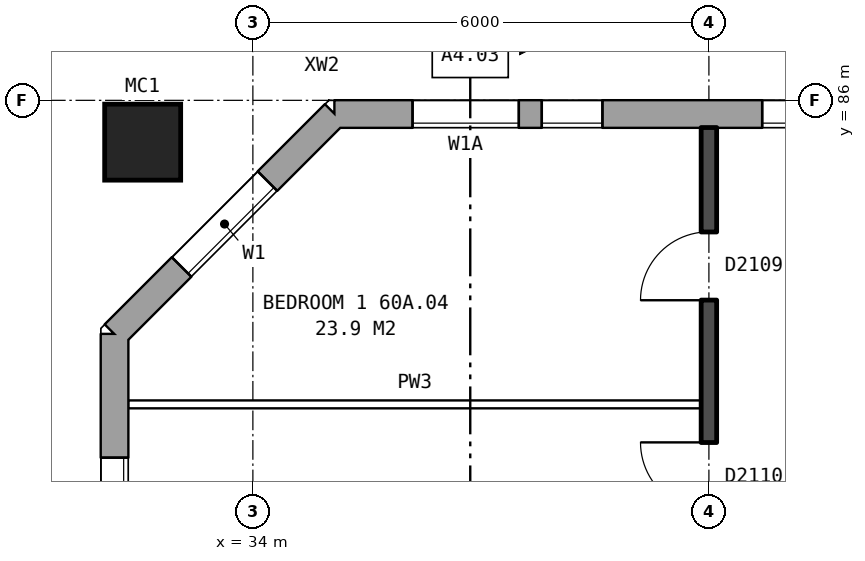
"""IFC4 building model, lengths in metres.
Left out: names, types, materials, properties, quantities, classifications, styles, units other than length and angle.
Written with IfcOpenShell. Run it as: python <this file> out.ifc"""

import sys

from ifc_helpers import new_model, si_unit, direction, frame, frame_2d, origin, origin_2d, place, context, subcontext, project, spatial, rectangle, hollow_rectangle, extrude, element, fill, save


model = new_model("IFC4")
c1 = context("Model", 3, precision=1e-05, world=origin(), true_north=direction((0.0, 1.0)))
c2 = subcontext(c1, "Body", "Model", "MODEL_VIEW")
j1 = project(units=[si_unit("LENGTHUNIT", "METRE"), si_unit("PLANEANGLEUNIT", "RADIAN")], contexts=[c1])
p1 = place(None, origin())
s1 = spatial("IfcSite", under=j1, at=p1, CompositionType="ELEMENT")
p2 = place(p1, origin())
s2 = spatial("IfcBuilding", under=s1, at=p2, CompositionType="ELEMENT")
p3 = place(p2, frame((0.0, 0.0, 212.1)))
s3 = spatial("IfcBuildingStorey", under=s2, at=p3, CompositionType="ELEMENT", Elevation=212.1)
p4 = place(p3, frame((32.55, 85.45, 0.0), z_axis=(0.0, 0.0, 1.0), x_axis=(1.0, 0.0, 0.0)))
e1 = element("IfcColumn", 1, at=p4, inside=s3, PredefinedType="COLUMN", context=c2, shape_type="SweptSolid", body=[
    extrude(hollow_rectangle(XDim=1.0, YDim=1.0, WallThickness=0.055, at=origin_2d()), origin(), (0.0, 0.0, 1.0), 3.1),
])
p5 = place(p3, frame((74.95, 85.82, 0.0), z_axis=(0.0, 0.0, 1.0), x_axis=(-1.0, 0.0, 0.0)))
e2 = element("IfcWall", 2, at=p5, inside=s3, PredefinedType="STANDARD", context=c2, shape_type="SweptSolid", body=[
    extrude(rectangle(XDim=39.875, YDim=0.36, at=frame_2d((19.938, 0.0))), origin(), (0.0, 0.0, 1.0), 2.85),
])
p6 = place(p5, frame((2.65, 0.0, 0.8)))
e3 = element("IfcOpeningElement", 3, at=p6, cuts=e2, PredefinedType="OPENING", context=c2, shape_type="SweptSolid", body=[
    extrude(rectangle(XDim=1.6, YDim=1.8, at=frame_2d((0.8, 0.9))), frame((0.0, 0.19, 0.0), z_axis=(0.0, -1.0, 0.0), x_axis=(1.0, 0.0, 0.0)), (0.0, 0.0, 1.0), 0.38),
])
p7 = place(p5, frame((5.15, 0.0, 1.5)))
e4 = element("IfcOpeningElement", 4, at=p7, cuts=e2, PredefinedType="OPENING", context=c2, shape_type="SweptSolid", body=[
    extrude(rectangle(XDim=0.6, YDim=0.9, at=frame_2d((0.3, 0.45))), frame((0.0, 0.19, 0.0), z_axis=(0.0, -1.0, 0.0), x_axis=(1.0, 0.0, 0.0)), (0.0, 0.0, 1.0), 0.38),
])
p8 = place(p5, frame((8.65, 0.0, 0.8)))
e5 = element("IfcOpeningElement", 5, at=p8, cuts=e2, PredefinedType="OPENING", context=c2, shape_type="SweptSolid", body=[
    extrude(rectangle(XDim=1.6, YDim=1.8, at=frame_2d((0.8, 0.9))), frame((0.0, 0.19, 0.0), z_axis=(0.0, -1.0, 0.0), x_axis=(1.0, 0.0, 0.0)), (0.0, 0.0, 1.0), 0.38),
])
p9 = place(p5, frame((11.65, 0.0, 0.8)))
e6 = element("IfcOpeningElement", 6, at=p9, cuts=e2, PredefinedType="OPENING", context=c2, shape_type="SweptSolid", body=[
    extrude(rectangle(XDim=1.6, YDim=1.8, at=frame_2d((0.8, 0.9))), frame((0.0, 0.19, 0.0), z_axis=(0.0, -1.0, 0.0), x_axis=(1.0, 0.0, 0.0)), (0.0, 0.0, 1.0), 0.38),
])
p10 = place(p5, frame((14.65, 0.0, 0.8)))
e7 = element("IfcOpeningElement", 7, at=p10, cuts=e2, PredefinedType="OPENING", context=c2, shape_type="SweptSolid", body=[
    extrude(rectangle(XDim=1.6, YDim=1.8, at=frame_2d((0.8, 0.9))), frame((0.0, 0.19, 0.0), z_axis=(0.0, -1.0, 0.0), x_axis=(1.0, 0.0, 0.0)), (0.0, 0.0, 1.0), 0.38),
])
p11 = place(p5, frame((17.65, 0.0, 0.8)))
e8 = element("IfcOpeningElement", 8, at=p11, cuts=e2, PredefinedType="OPENING", context=c2, shape_type="SweptSolid", body=[
    extrude(rectangle(XDim=1.6, YDim=1.8, at=frame_2d((0.8, 0.9))), frame((0.0, 0.19, 0.0), z_axis=(0.0, -1.0, 0.0), x_axis=(1.0, 0.0, 0.0)), (0.0, 0.0, 1.0), 0.38),
])
p12 = place(p5, frame((20.65, 0.0, 0.8)))
e9 = element("IfcOpeningElement", 9, at=p12, cuts=e2, PredefinedType="OPENING", context=c2, shape_type="SweptSolid", body=[
    extrude(rectangle(XDim=1.6, YDim=1.8, at=frame_2d((0.8, 0.9))), frame((0.0, 0.19, 0.0), z_axis=(0.0, -1.0, 0.0), x_axis=(1.0, 0.0, 0.0)), (0.0, 0.0, 1.0), 0.38),
])
p13 = place(p5, frame((23.65, 0.0, 0.8)))
e10 = element("IfcOpeningElement", 10, at=p13, cuts=e2, PredefinedType="OPENING", context=c2, shape_type="SweptSolid", body=[
    extrude(rectangle(XDim=1.6, YDim=1.8, at=frame_2d((0.8, 0.9))), frame((0.0, 0.19, 0.0), z_axis=(0.0, -1.0, 0.0), x_axis=(1.0, 0.0, 0.0)), (0.0, 0.0, 1.0), 0.38),
])
p14 = place(p5, frame((26.65, 0.0, 0.8)))
e11 = element("IfcOpeningElement", 11, at=p14, cuts=e2, PredefinedType="OPENING", context=c2, shape_type="SweptSolid", body=[
    extrude(rectangle(XDim=1.6, YDim=1.8, at=frame_2d((0.8, 0.9))), frame((0.0, 0.19, 0.0), z_axis=(0.0, -1.0, 0.0), x_axis=(1.0, 0.0, 0.0)), (0.0, 0.0, 1.0), 0.38),
])
p15 = place(p5, frame((29.65, 0.0, 0.8)))
e12 = element("IfcOpeningElement", 12, at=p15, cuts=e2, PredefinedType="OPENING", context=c2, shape_type="SweptSolid", body=[
    extrude(rectangle(XDim=1.6, YDim=1.8, at=frame_2d((0.8, 0.9))), frame((0.0, 0.19, 0.0), z_axis=(0.0, -1.0, 0.0), x_axis=(1.0, 0.0, 0.0)), (0.0, 0.0, 1.0), 0.38),
])
p16 = place(p5, frame((32.65, 0.0, 0.8)))
e13 = element("IfcOpeningElement", 13, at=p16, cuts=e2, PredefinedType="OPENING", context=c2, shape_type="SweptSolid", body=[
    extrude(rectangle(XDim=1.6, YDim=1.8, at=frame_2d((0.8, 0.9))), frame((0.0, 0.19, 0.0), z_axis=(0.0, -1.0, 0.0), x_axis=(1.0, 0.0, 0.0)), (0.0, 0.0, 1.0), 0.38),
])
p17 = place(p5, frame((36.35, 0.0, 1.1)))
e14 = element("IfcOpeningElement", 14, at=p17, cuts=e2, PredefinedType="OPENING", context=c2, shape_type="SweptSolid", body=[
    extrude(rectangle(XDim=0.8, YDim=1.5, at=frame_2d((0.4, 0.75))), frame((0.0, 0.19, 0.0), z_axis=(0.0, -1.0, 0.0), x_axis=(1.0, 0.0, 0.0)), (0.0, 0.0, 1.0), 0.38),
])
p18 = place(p5, frame((7.45, 0.0, 0.8)))
e15 = element("IfcOpeningElement", 15, at=p18, cuts=e2, PredefinedType="OPENING", context=c2, shape_type="SweptSolid", body=[
    extrude(rectangle(XDim=0.8, YDim=1.5, at=frame_2d((0.4, 0.75))), frame((0.0, 0.19, 0.0), z_axis=(0.0, -1.0, 0.0), x_axis=(1.0, 0.0, 0.0)), (0.0, 0.0, 1.0), 0.38),
])
p19 = place(p5, frame((37.45, 0.0, 0.8)))
e16 = element("IfcOpeningElement", 16, at=p19, cuts=e2, PredefinedType="OPENING", context=c2, shape_type="SweptSolid", body=[
    extrude(rectangle(XDim=1.4, YDim=1.8, at=frame_2d((0.7, 0.9))), frame((0.0, 0.19, 0.0), z_axis=(0.0, -1.0, 0.0), x_axis=(1.0, 0.0, 0.0)), (0.0, 0.0, 1.0), 0.38),
])
p20 = place(p3, frame((35.075, 85.82, 0.0), z_axis=(0.0, 0.0, 1.0), x_axis=(-0.707106781187, -0.707106781187, 0.0)))
e17 = element("IfcWall", 17, at=p20, inside=s3, PredefinedType="STANDARD", context=c2, shape_type="SweptSolid", body=[
    extrude(rectangle(XDim=4.094, YDim=0.36, at=frame_2d((2.047, 0.0))), origin(), (0.0, 0.0, 1.0), 2.85),
])
p21 = place(p20, frame((1.247, 0.0, 0.8)))
e18 = element("IfcOpeningElement", 18, at=p21, cuts=e17, PredefinedType="OPENING", context=c2, shape_type="SweptSolid", body=[
    extrude(rectangle(XDim=1.6, YDim=1.8, at=frame_2d((0.8, 0.9))), frame((0.0, 0.19, 0.0), z_axis=(0.0, -1.0, 0.0), x_axis=(1.0, 0.0, 0.0)), (0.0, 0.0, 1.0), 0.38),
])
p22 = place(p3, frame((32.18, 82.925, 0.0), z_axis=(0.0, 0.0, 1.0), x_axis=(0.0, -1.0, 0.0)))
e19 = element("IfcWall", 19, at=p22, inside=s3, PredefinedType="STANDARD", context=c2, shape_type="SweptSolid", body=[
    extrude(rectangle(XDim=25.851, YDim=0.36, at=frame_2d((12.925, 0.0))), origin(), (0.0, 0.0, 1.0), 2.85),
])
p23 = place(p22, frame((1.625, 0.0, 0.8)))
e20 = element("IfcOpeningElement", 20, at=p23, cuts=e19, PredefinedType="OPENING", context=c2, shape_type="SweptSolid", body=[
    extrude(rectangle(XDim=1.6, YDim=1.8, at=frame_2d((0.8, 0.9))), frame((0.0, 0.19, 0.0), z_axis=(0.0, -1.0, 0.0), x_axis=(1.0, 0.0, 0.0)), (0.0, 0.0, 1.0), 0.38),
])
p24 = place(p22, frame((4.625, 0.0, 0.8)))
e21 = element("IfcOpeningElement", 21, at=p24, cuts=e19, PredefinedType="OPENING", context=c2, shape_type="SweptSolid", body=[
    extrude(rectangle(XDim=1.6, YDim=1.8, at=frame_2d((0.8, 0.9))), frame((0.0, 0.19, 0.0), z_axis=(0.0, -1.0, 0.0), x_axis=(1.0, 0.0, 0.0)), (0.0, 0.0, 1.0), 0.38),
])
p25 = place(p22, frame((19.625, 0.0, 0.8)))
e22 = element("IfcOpeningElement", 22, at=p25, cuts=e19, PredefinedType="OPENING", context=c2, shape_type="SweptSolid", body=[
    extrude(rectangle(XDim=1.6, YDim=1.8, at=frame_2d((0.8, 0.9))), frame((0.0, 0.19, 0.0), z_axis=(0.0, -1.0, 0.0), x_axis=(1.0, 0.0, 0.0)), (0.0, 0.0, 1.0), 0.38),
])
p26 = place(p22, frame((22.625, 0.0, 0.8)))
e23 = element("IfcOpeningElement", 23, at=p26, cuts=e19, PredefinedType="OPENING", context=c2, shape_type="SweptSolid", body=[
    extrude(rectangle(XDim=1.6, YDim=1.8, at=frame_2d((0.8, 0.9))), frame((0.0, 0.19, 0.0), z_axis=(0.0, -1.0, 0.0), x_axis=(1.0, 0.0, 0.0)), (0.0, 0.0, 1.0), 0.38),
])
p27 = place(p3, frame((32.36, 82.0, 0.0), z_axis=(0.0, 0.0, 1.0), x_axis=(1.0, 0.0, 0.0)))
e24 = element("IfcWall", 24, at=p27, inside=s3, PredefinedType="PARTITIONING", context=c2, shape_type="SweptSolid", body=[
    extrude(rectangle(XDim=7.54, YDim=0.1, at=frame_2d((3.77, 0.0))), origin(), (0.0, 0.0, 1.0), 2.85),
])
p28 = place(p3, frame((40.0, 76.2, 0.0), z_axis=(0.0, 0.0, 1.0), x_axis=(0.0, 1.0, 0.0)))
e25 = element("IfcWall", 25, at=p28, inside=s3, PredefinedType="SOLIDWALL", context=c2, shape_type="SweptSolid", body=[
    extrude(rectangle(XDim=9.44, YDim=0.2, at=frame_2d((4.72, 0.0))), origin(), (0.0, 0.0, 1.0), 2.85),
])
p29 = place(p28, frame((7.17, 0.0, 0.0)))
e26 = element("IfcOpeningElement", 26, at=p29, cuts=e25, PredefinedType="OPENING", context=c2, shape_type="SweptSolid", body=[
    extrude(rectangle(XDim=0.9, YDim=2.1, at=frame_2d((0.45, 1.05))), frame((0.0, 0.11, 0.0), z_axis=(0.0, -1.0, 0.0), x_axis=(1.0, 0.0, 0.0)), (0.0, 0.0, 1.0), 0.22),
])
p30 = place(p28, frame((4.4, 0.0, 0.0)))
e27 = element("IfcOpeningElement", 27, at=p30, cuts=e25, PredefinedType="OPENING", context=c2, shape_type="SweptSolid", body=[
    extrude(rectangle(XDim=0.9, YDim=2.1, at=frame_2d((0.45, 1.05))), frame((0.0, 0.11, 0.0), z_axis=(0.0, -1.0, 0.0), x_axis=(1.0, 0.0, 0.0)), (0.0, 0.0, 1.0), 0.22),
])
p31 = place(p28, frame((0.95, 0.0, 0.0)))
e28 = element("IfcOpeningElement", 28, at=p31, cuts=e25, PredefinedType="OPENING", context=c2, shape_type="SweptSolid", body=[
    extrude(rectangle(XDim=0.9, YDim=2.1, at=frame_2d((0.45, 1.05))), frame((0.0, 0.11, 0.0), z_axis=(0.0, -1.0, 0.0), x_axis=(1.0, 0.0, 0.0)), (0.0, 0.0, 1.0), 0.22),
])
p32 = place(p16, origin())
e29 = element("IfcWindow", 29, at=p32, inside=s3, PartitioningType="SINGLE_PANEL", PredefinedType="WINDOW", context=c2, shape_type="SweptSolid", body=[
    extrude(rectangle(XDim=1.6, YDim=1.8, at=frame_2d((0.8, 0.9))), frame((0.0, 0.15, 0.0), z_axis=(0.0, -1.0, 0.0), x_axis=(1.0, 0.0, 0.0)), (0.0, 0.0, 1.0), 0.06),
])
fill(e13, e29)
p33 = place(p17, origin())
e30 = element("IfcWindow", 30, at=p33, inside=s3, PartitioningType="SINGLE_PANEL", PredefinedType="WINDOW", context=c2, shape_type="SweptSolid", body=[
    extrude(rectangle(XDim=0.8, YDim=1.5, at=frame_2d((0.4, 0.75))), frame((0.0, 0.15, 0.0), z_axis=(0.0, -1.0, 0.0), x_axis=(1.0, 0.0, 0.0)), (0.0, 0.0, 1.0), 0.06),
])
fill(e14, e30)
p34 = place(p21, origin())
e31 = element("IfcWindow", 31, at=p34, inside=s3, PartitioningType="SINGLE_PANEL", PredefinedType="WINDOW", context=c2, shape_type="SweptSolid", body=[
    extrude(rectangle(XDim=1.6, YDim=1.8, at=frame_2d((0.8, 0.9))), frame((0.0, 0.15, 0.0), z_axis=(0.0, -1.0, 0.0), x_axis=(1.0, 0.0, 0.0)), (0.0, 0.0, 1.0), 0.06),
])
fill(e18, e31)
p35 = place(p23, origin())
e32 = element("IfcWindow", 32, at=p35, inside=s3, PartitioningType="SINGLE_PANEL", PredefinedType="WINDOW", context=c2, shape_type="SweptSolid", body=[
    extrude(rectangle(XDim=1.6, YDim=1.8, at=frame_2d((0.8, 0.9))), frame((0.0, 0.15, 0.0), z_axis=(0.0, -1.0, 0.0), x_axis=(1.0, 0.0, 0.0)), (0.0, 0.0, 1.0), 0.06),
])
fill(e20, e32)
p36 = place(p29, origin())
e33 = element("IfcDoor", 33, at=p36, inside=s3, OperationType="SINGLE_SWING_LEFT", PredefinedType="DOOR", context=c2, shape_type="SweptSolid", body=[
    extrude(rectangle(XDim=0.9, YDim=2.1, at=frame_2d((0.45, 1.05))), frame((0.0, 0.025, 0.0), z_axis=(0.0, -1.0, 0.0), x_axis=(1.0, 0.0, 0.0)), (0.0, 0.0, 1.0), 0.05),
])
fill(e26, e33)
p37 = place(p30, origin())
e34 = element("IfcDoor", 34, at=p37, inside=s3, OperationType="SINGLE_SWING_RIGHT", PredefinedType="DOOR", context=c2, shape_type="SweptSolid", body=[
    extrude(rectangle(XDim=0.9, YDim=2.1, at=frame_2d((0.45, 1.05))), frame((0.0, 0.025, 0.0), z_axis=(0.0, -1.0, 0.0), x_axis=(1.0, 0.0, 0.0)), (0.0, 0.0, 1.0), 0.05),
])
fill(e27, e34)
p38 = place(p19, origin())
e35 = element("IfcWindow", 35, at=p38, inside=s3, PartitioningType="SINGLE_PANEL", PredefinedType="WINDOW", context=c2, shape_type="SweptSolid", body=[
    extrude(rectangle(XDim=1.4, YDim=1.8, at=frame_2d((0.7, 0.9))), frame((0.0, 0.15, 0.0), z_axis=(0.0, -1.0, 0.0), x_axis=(1.0, 0.0, 0.0)), (0.0, 0.0, 1.0), 0.06),
])
fill(e16, e35)
save(model, sys.argv[1])
